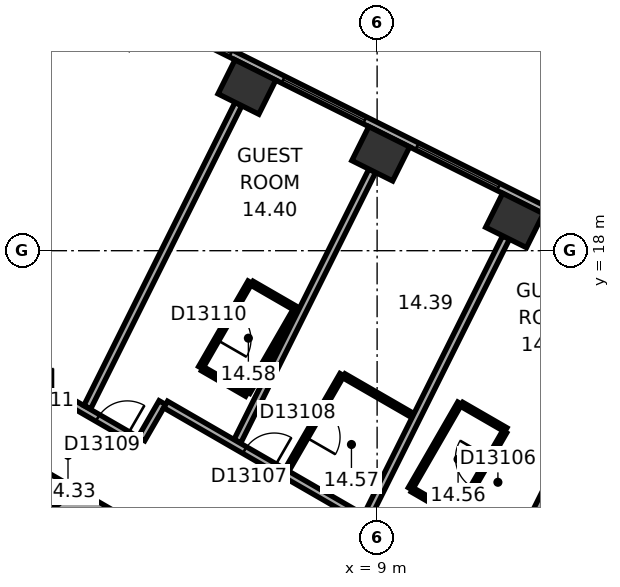
"""IFC4 building model, lengths in metres.
Left out: names, types, materials, properties, quantities, classifications, styles, units other than length and angle.
Written with IfcOpenShell. Run it as: python <this file> out.ifc"""

import sys

from ifc_helpers import new_model, si_unit, direction, frame, frame_2d, origin, origin_2d, place, context, subcontext, project, spatial, rectangle, extrude, element, fill, save


model = new_model("IFC4")
c1 = context("Model", 3, precision=1e-05, world=origin(), true_north=direction((0.0, 1.0)))
c2 = subcontext(c1, "Body", "Model", "MODEL_VIEW")
j1 = project(units=[si_unit("LENGTHUNIT", "METRE"), si_unit("PLANEANGLEUNIT", "RADIAN")], contexts=[c1])
p1 = place(None, origin())
s1 = spatial("IfcSite", under=j1, at=p1, CompositionType="ELEMENT")
p2 = place(p1, origin())
s2 = spatial("IfcBuilding", under=s1, at=p2, CompositionType="ELEMENT")
p3 = place(p2, frame((0.0, 0.0, 67.1)))
s3 = spatial("IfcBuildingStorey", under=s2, at=p3, CompositionType="ELEMENT", Elevation=67.1)
for number, where, z_axis, x_axis in (
    (1, (12.616, 18.795, 0.0), (0.0, 0.0, 1.0), (-0.895, 0.446, 0.0)),
    (2, (9.095, 20.551, 0.0), (0.0, 0.0, 1.0), (-0.895, 0.446, 0.0)),
    (3, (5.574, 22.306, 0.0), (0.0, 0.0, 1.0), (-0.895, 0.446, 0.0)),
):
    element("IfcColumn", number, at=place(p3, frame(where, z_axis=z_axis, x_axis=x_axis)), inside=s3, PredefinedType="COLUMN", context=c2, shape_type="SweptSolid", body=[
        extrude(rectangle(XDim=1.2, YDim=1.0, at=origin_2d()), origin(), (0.0, 0.0, 1.0), 3.3),
    ])
p4 = place(p3, frame((10.4, 5.658, 0.0), z_axis=(0.0, 0.0, 1.0), x_axis=(-0.866021384402, 0.500006961711, 0.0)))
e4 = element("IfcWall", 4, at=p4, inside=s3, PredefinedType="SHEAR", context=c2, shape_type="SweptSolid", body=[
    extrude(rectangle(XDim=12.355, YDim=1.2, at=frame_2d((6.178, 0.0))), origin(), (0.0, 0.0, 1.0), 3.3),
])
p5 = place(p4, frame((2.728, 0.0, 0.0)))
e5 = element("IfcOpeningElement", 5, at=p5, cuts=e4, PredefinedType="OPENING", context=c2, shape_type="SweptSolid", body=[
    extrude(rectangle(XDim=1.1, YDim=2.1, at=frame_2d((0.55, 1.05))), frame((0.0, 0.61, 0.0), z_axis=(0.0, -1.0, 0.0), x_axis=(1.0, 0.0, 0.0)), (0.0, 0.0, 1.0), 1.22),
])
p6 = place(p4, frame((5.328, 0.0, 0.0)))
e6 = element("IfcOpeningElement", 6, at=p6, cuts=e4, PredefinedType="OPENING", context=c2, shape_type="SweptSolid", body=[
    extrude(rectangle(XDim=1.1, YDim=2.1, at=frame_2d((0.55, 1.05))), frame((0.0, 0.61, 0.0), z_axis=(0.0, -1.0, 0.0), x_axis=(1.0, 0.0, 0.0)), (0.0, 0.0, 1.0), 1.22),
])
p7 = place(p4, frame((7.928, 0.0, 0.0)))
e7 = element("IfcOpeningElement", 7, at=p7, cuts=e4, PredefinedType="OPENING", context=c2, shape_type="SweptSolid", body=[
    extrude(rectangle(XDim=1.1, YDim=2.1, at=frame_2d((0.55, 1.05))), frame((0.0, 0.61, 0.0), z_axis=(0.0, -1.0, 0.0), x_axis=(1.0, 0.0, 0.0)), (0.0, 0.0, 1.0), 1.22),
])
p8 = place(p3, frame((0.3, 11.836, 0.0), z_axis=(0.0, 0.0, 1.0), x_axis=(-0.866021384402, -0.500006961711, 0.0)))
e8 = element("IfcWall", 8, at=p8, inside=s3, PredefinedType="SHEAR", context=c2, shape_type="SweptSolid", body=[
    extrude(rectangle(XDim=12.355, YDim=1.2, at=frame_2d((6.178, 0.0))), origin(), (0.0, 0.0, 1.0), 3.3),
])
p9 = place(p8, frame((6.378, 0.0, 0.0)))
e9 = element("IfcOpeningElement", 9, at=p9, cuts=e8, PredefinedType="OPENING", context=c2, shape_type="SweptSolid", body=[
    extrude(rectangle(XDim=1.5, YDim=2.1, at=frame_2d((0.75, 1.05))), frame((0.0, 0.61, 0.0), z_axis=(0.0, -1.0, 0.0), x_axis=(1.0, 0.0, 0.0)), (0.0, 0.0, 1.0), 1.22),
])
p10 = place(p8, frame((1.828, 0.0, 0.0)))
e10 = element("IfcOpeningElement", 10, at=p10, cuts=e8, PredefinedType="OPENING", context=c2, shape_type="SweptSolid", body=[
    extrude(rectangle(XDim=1.1, YDim=2.1, at=frame_2d((0.55, 1.05))), frame((0.0, 0.61, 0.0), z_axis=(0.0, -1.0, 0.0), x_axis=(1.0, 0.0, 0.0)), (0.0, 0.0, 1.0), 1.22),
])
p11 = place(p3, frame((20.63, 15.47, 0.0), z_axis=(0.0, 0.0, 1.0), x_axis=(-0.894934518609, 0.446197498203, 0.0)))
e11 = element("IfcWall", 11, at=p11, inside=s3, PredefinedType="STANDARD", context=c2, shape_type="SweptSolid", body=[
    extrude(rectangle(XDim=21.246, YDim=0.2, at=frame_2d((10.623, 0.0))), origin(), (0.0, 0.0, 1.0), 3.3),
])
p12 = place(p11, frame((1.553, 0.0, 0.8)))
e12 = element("IfcOpeningElement", 12, at=p12, cuts=e11, PredefinedType="OPENING", context=c2, shape_type="SweptSolid", body=[
    extrude(rectangle(XDim=2.4, YDim=1.7, at=frame_2d((1.2, 0.85))), frame((0.0, 0.11, 0.0), z_axis=(0.0, -1.0, 0.0), x_axis=(1.0, 0.0, 0.0)), (0.0, 0.0, 1.0), 0.22),
])
p13 = place(p11, frame((5.488, 0.0, 0.8)))
e13 = element("IfcOpeningElement", 13, at=p13, cuts=e11, PredefinedType="OPENING", context=c2, shape_type="SweptSolid", body=[
    extrude(rectangle(XDim=2.4, YDim=1.7, at=frame_2d((1.2, 0.85))), frame((0.0, 0.11, 0.0), z_axis=(0.0, -1.0, 0.0), x_axis=(1.0, 0.0, 0.0)), (0.0, 0.0, 1.0), 0.22),
])
p14 = place(p11, frame((9.422, 0.0, 0.8)))
e14 = element("IfcOpeningElement", 14, at=p14, cuts=e11, PredefinedType="OPENING", context=c2, shape_type="SweptSolid", body=[
    extrude(rectangle(XDim=2.4, YDim=1.7, at=frame_2d((1.2, 0.85))), frame((0.0, 0.11, 0.0), z_axis=(0.0, -1.0, 0.0), x_axis=(1.0, 0.0, 0.0)), (0.0, 0.0, 1.0), 0.22),
])
p15 = place(p11, frame((13.357, 0.0, 0.8)))
e15 = element("IfcOpeningElement", 15, at=p15, cuts=e11, PredefinedType="OPENING", context=c2, shape_type="SweptSolid", body=[
    extrude(rectangle(XDim=2.4, YDim=1.7, at=frame_2d((1.2, 0.85))), frame((0.0, 0.11, 0.0), z_axis=(0.0, -1.0, 0.0), x_axis=(1.0, 0.0, 0.0)), (0.0, 0.0, 1.0), 0.22),
])
p16 = place(p11, frame((17.292, 0.0, 0.8)))
e16 = element("IfcOpeningElement", 16, at=p16, cuts=e11, PredefinedType="OPENING", context=c2, shape_type="SweptSolid", body=[
    extrude(rectangle(XDim=2.4, YDim=1.7, at=frame_2d((1.2, 0.85))), frame((0.0, 0.11, 0.0), z_axis=(0.0, -1.0, 0.0), x_axis=(1.0, 0.0, 0.0)), (0.0, 0.0, 1.0), 0.22),
])
p17 = place(p3, frame((0.95, 14.001, 0.0), z_axis=(0.0, 0.0, 1.0), x_axis=(-1.0, 0.0, 0.0)))
e17 = element("IfcWall", 17, at=p17, inside=s3, PredefinedType="PARTITIONING", context=c2, shape_type="SweptSolid", body=[
    extrude(rectangle(XDim=1.86, YDim=0.2, at=frame_2d((0.93, 0.0))), origin(), (0.0, 0.0, 1.0), 3.05),
])
p18 = place(p17, frame((0.48, 0.0, 0.0)))
e18 = element("IfcOpeningElement", 18, at=p18, cuts=e17, PredefinedType="OPENING", context=c2, shape_type="SweptSolid", body=[
    extrude(rectangle(XDim=0.9, YDim=2.1, at=frame_2d((0.45, 1.05))), frame((0.0, 0.11, 0.0), z_axis=(0.0, -1.0, 0.0), x_axis=(1.0, 0.0, 0.0)), (0.0, 0.0, 1.0), 0.22),
])
p19 = place(p3, frame((2.748, 12.962, 0.0), z_axis=(0.0, 0.0, 1.0), x_axis=(-0.866013897511, 0.50001992892, 0.0)))
e19 = element("IfcWall", 19, at=p19, inside=s3, PredefinedType="PARTITIONING", context=c2, shape_type="SweptSolid", body=[
    extrude(rectangle(XDim=2.037, YDim=0.2, at=frame_2d((1.018, 0.0))), origin(), (0.0, 0.0, 1.0), 3.05),
])
p20 = place(p19, frame((0.372, 0.0, 0.0)))
e20 = element("IfcOpeningElement", 20, at=p20, cuts=e19, PredefinedType="OPENING", context=c2, shape_type="SweptSolid", body=[
    extrude(rectangle(XDim=0.9, YDim=2.1, at=frame_2d((0.45, 1.05))), frame((0.0, 0.11, 0.0), z_axis=(0.0, -1.0, 0.0), x_axis=(1.0, 0.0, 0.0)), (0.0, 0.0, 1.0), 0.22),
])
p21 = place(p3, frame((3.349, 14.002, 0.0), z_axis=(0.0, 0.0, 1.0), x_axis=(-0.500074377092, -0.865982457891, 0.0)))
e21 = element("IfcWall", 21, at=p21, inside=s3, PredefinedType="PARTITIONING", context=c2, shape_type="SweptSolid", body=[
    extrude(rectangle(XDim=1.101, YDim=0.2, at=frame_2d((0.55, 0.0))), origin(), (0.0, 0.0, 1.0), 3.05),
])
p22 = place(p3, frame((4.356, 14.922, 0.0), z_axis=(0.0, 0.0, 1.0), x_axis=(0.499936506574, 0.866062058628, 0.0)))
e22 = element("IfcWall", 22, at=p22, inside=s3, PredefinedType="PARTITIONING", context=c2, shape_type="SweptSolid", body=[
    extrude(rectangle(XDim=2.6, YDim=0.12, at=frame_2d((1.3, 0.0))), origin(), (0.0, 0.0, 1.0), 3.05),
])
p23 = place(p22, frame((0.85, 0.0, 0.0)))
e23 = element("IfcOpeningElement", 23, at=p23, cuts=e22, PredefinedType="OPENING", context=c2, shape_type="SweptSolid", body=[
    extrude(rectangle(XDim=0.9, YDim=2.1, at=frame_2d((0.45, 1.05))), frame((0.0, 0.07, 0.0), z_axis=(0.0, -1.0, 0.0), x_axis=(1.0, 0.0, 0.0)), (0.0, 0.0, 1.0), 0.14),
])
p24 = place(p3, frame((5.351, 21.859, 0.0), z_axis=(0.0, 0.0, 1.0), x_axis=(-0.446205309328, -0.894930624086, 0.0)))
e24 = element("IfcWall", 24, at=p24, inside=s3, PredefinedType="PARTITIONING", context=c2, shape_type="SweptSolid", body=[
    extrude(rectangle(XDim=8.913, YDim=0.2, at=frame_2d((4.457, 0.0))), origin(), (0.0, 0.0, 1.0), 2.6),
])
p25 = place(p3, frame((5.569, 14.222, 0.0), z_axis=(0.0, 0.0, 1.0), x_axis=(-0.866036909293, 0.499980071345, 0.0)))
e25 = element("IfcWall", 25, at=p25, inside=s3, PredefinedType="PARTITIONING", context=c2, shape_type="SweptSolid", body=[
    extrude(rectangle(XDim=1.34, YDim=0.12, at=frame_2d((0.67, 0.0))), origin(), (0.0, 0.0, 1.0), 3.05),
])
p26 = place(p3, frame((5.708, 17.144, 0.0), z_axis=(0.0, 0.0, 1.0), x_axis=(0.866082447003, -0.499901185229, 0.0)))
e26 = element("IfcWall", 26, at=p26, inside=s3, PredefinedType="PARTITIONING", context=c2, shape_type="SweptSolid", body=[
    extrude(rectangle(XDim=1.34, YDim=0.12, at=frame_2d((0.67, 0.0))), origin(), (0.0, 0.0, 1.0), 3.05),
])
p27 = place(p3, frame((6.625, 12.227, 0.0), z_axis=(0.0, 0.0, 1.0), x_axis=(0.500023687443, 0.866011727401, 0.0)))
e27 = element("IfcWall", 27, at=p27, inside=s3, PredefinedType="PARTITIONING", context=c2, shape_type="SweptSolid", body=[
    extrude(rectangle(XDim=2.9, YDim=0.12, at=frame_2d((1.45, 0.0))), origin(), (0.0, 0.0, 1.0), 3.05),
])
p28 = place(p27, frame((1.0, 0.0, 0.0)))
e28 = element("IfcOpeningElement", 28, at=p28, cuts=e27, PredefinedType="OPENING", context=c2, shape_type="SweptSolid", body=[
    extrude(rectangle(XDim=0.9, YDim=2.1, at=frame_2d((0.45, 1.05))), frame((0.0, 0.07, 0.0), z_axis=(0.0, -1.0, 0.0), x_axis=(1.0, 0.0, 0.0)), (0.0, 0.0, 1.0), 0.14),
])
p29 = place(p3, frame((6.839, 16.422, 0.0), z_axis=(0.0, 0.0, 1.0), x_axis=(-0.50000366821, -0.866023285932, 0.0)))
e29 = element("IfcWall", 29, at=p29, inside=s3, PredefinedType="PARTITIONING", context=c2, shape_type="SweptSolid", body=[
    extrude(rectangle(XDim=2.48, YDim=0.12, at=frame_2d((1.24, 0.0))), origin(), (0.0, 0.0, 1.0), 3.05),
])
p30 = place(p3, frame((8.127, 14.708, 0.0), z_axis=(0.0, 0.0, 1.0), x_axis=(0.866065472234, -0.499930592986, 0.0)))
e30 = element("IfcWall", 30, at=p30, inside=s3, PredefinedType="PARTITIONING", context=c2, shape_type="SweptSolid", body=[
    extrude(rectangle(XDim=2.098, YDim=0.12, at=frame_2d((1.049, 0.0))), origin(), (0.0, 0.0, 1.0), 3.05),
])
p31 = place(p3, frame((8.872, 20.104, 0.0), z_axis=(0.0, 0.0, 1.0), x_axis=(-0.446218378653, -0.894924107706, 0.0)))
e31 = element("IfcWall", 31, at=p31, inside=s3, PredefinedType="PARTITIONING", context=c2, shape_type="SweptSolid", body=[
    extrude(rectangle(XDim=7.95, YDim=0.2, at=frame_2d((3.975, 0.0))), origin(), (0.0, 0.0, 1.0), 3.05),
])
p32 = place(p3, frame((9.875, 11.736, 0.0), z_axis=(0.0, 0.0, 1.0), x_axis=(0.499936506574, 0.866062058628, 0.0)))
e32 = element("IfcWall", 32, at=p32, inside=s3, PredefinedType="PARTITIONING", context=c2, shape_type="SweptSolid", body=[
    extrude(rectangle(XDim=2.6, YDim=0.12, at=frame_2d((1.3, 0.0))), origin(), (0.0, 0.0, 1.0), 3.05),
])
p33 = place(p3, frame((10.885, 9.652, 0.0), z_axis=(0.0, 0.0, 1.0), x_axis=(-0.866033868542, 0.499985338323, 0.0)))
e33 = element("IfcWall", 33, at=p33, inside=s3, PredefinedType="PARTITIONING", context=c2, shape_type="SweptSolid", body=[
    extrude(rectangle(XDim=8.602, YDim=0.2, at=frame_2d((4.301, 0.0))), origin(), (0.0, 0.0, 1.0), 3.05),
])
p34 = place(p33, frame((5.302, 0.0, 0.0)))
e34 = element("IfcOpeningElement", 34, at=p34, cuts=e33, PredefinedType="OPENING", context=c2, shape_type="SweptSolid", body=[
    extrude(rectangle(XDim=0.9, YDim=2.1, at=frame_2d((0.45, 1.05))), frame((0.0, 0.11, 0.0), z_axis=(0.0, -1.0, 0.0), x_axis=(1.0, 0.0, 0.0)), (0.0, 0.0, 1.0), 0.22),
])
for number, where, z_axis, x_axis in (
    (35, (11.087, 11.036, 0.0), (0.0, 0.0, 1.0), (-0.866, 0.5, 0.0)),
    (36, (11.226, 13.958, 0.0), (0.0, 0.0, 1.0), (0.866, -0.5, 0.0)),
):
    element("IfcWall", number, at=place(p3, frame(where, z_axis=z_axis, x_axis=x_axis)), inside=s3, PredefinedType="PARTITIONING", context=c2, shape_type="SweptSolid", body=[
        extrude(rectangle(XDim=1.34, YDim=0.12, at=frame_2d((0.67, 0.0))), origin(), (0.0, 0.0, 1.0), 3.05),
    ])
p35 = place(p3, frame((12.357, 13.236, 0.0), z_axis=(0.0, 0.0, 1.0), x_axis=(-0.50000366821, -0.866023285932, 0.0)))
e37 = element("IfcWall", 37, at=p35, inside=s3, PredefinedType="PARTITIONING", context=c2, shape_type="SweptSolid", body=[
    extrude(rectangle(XDim=2.48, YDim=0.12, at=frame_2d((1.24, 0.0))), origin(), (0.0, 0.0, 1.0), 3.05),
])
p36 = place(p35, frame((0.79, 0.0, 0.0)))
e38 = element("IfcOpeningElement", 38, at=p36, cuts=e37, PredefinedType="OPENING", context=c2, shape_type="SweptSolid", body=[
    extrude(rectangle(XDim=0.9, YDim=2.1, at=frame_2d((0.45, 1.05))), frame((0.0, 0.07, 0.0), z_axis=(0.0, -1.0, 0.0), x_axis=(1.0, 0.0, 0.0)), (0.0, 0.0, 1.0), 0.14),
])
p37 = place(p3, frame((12.393, 18.348, 0.0), z_axis=(0.0, 0.0, 1.0), x_axis=(-0.446176022699, -0.894945225569, 0.0)))
e39 = element("IfcWall", 39, at=p37, inside=s3, PredefinedType="PARTITIONING", context=c2, shape_type="SweptSolid", body=[
    extrude(rectangle(XDim=8.191, YDim=0.2, at=frame_2d((4.095, 0.0))), origin(), (0.0, 0.0, 1.0), 2.6),
])
p38 = place(p3, frame((15.915, 16.592, 0.0), z_axis=(0.0, 0.0, 1.0), x_axis=(-0.446199736347, -0.894933402709, 0.0)))
e40 = element("IfcWall", 40, at=p38, inside=s3, PredefinedType="PARTITIONING", context=c2, shape_type="SweptSolid", body=[
    extrude(rectangle(XDim=9.635, YDim=0.2, at=frame_2d((4.817, 0.0))), origin(), (0.0, 0.0, 1.0), 3.05),
])
p39 = place(p14, origin())
e41 = element("IfcWindow", 41, at=p39, inside=s3, PartitioningType="SINGLE_PANEL", PredefinedType="WINDOW", context=c2, shape_type="SweptSolid", body=[
    extrude(rectangle(XDim=2.4, YDim=1.7, at=frame_2d((1.2, 0.85))), frame((0.0, 0.03, 0.0), z_axis=(0.0, -1.0, 0.0), x_axis=(1.0, 0.0, 0.0)), (0.0, 0.0, 1.0), 0.06),
])
fill(e14, e41)
p40 = place(p15, origin())
e42 = element("IfcWindow", 42, at=p40, inside=s3, PartitioningType="SINGLE_PANEL", PredefinedType="WINDOW", context=c2, shape_type="SweptSolid", body=[
    extrude(rectangle(XDim=2.4, YDim=1.7, at=frame_2d((1.2, 0.85))), frame((0.0, 0.03, 0.0), z_axis=(0.0, -1.0, 0.0), x_axis=(1.0, 0.0, 0.0)), (0.0, 0.0, 1.0), 0.06),
])
fill(e15, e42)
p41 = place(p16, origin())
e43 = element("IfcWindow", 43, at=p41, inside=s3, PartitioningType="SINGLE_PANEL", PredefinedType="WINDOW", context=c2, shape_type="SweptSolid", body=[
    extrude(rectangle(XDim=2.4, YDim=1.7, at=frame_2d((1.2, 0.85))), frame((0.0, 0.03, 0.0), z_axis=(0.0, -1.0, 0.0), x_axis=(1.0, 0.0, 0.0)), (0.0, 0.0, 1.0), 0.06),
])
fill(e16, e43)
p42 = place(p36, origin())
e44 = element("IfcDoor", 44, at=p42, inside=s3, OperationType="SINGLE_SWING_LEFT", PredefinedType="DOOR", context=c2, shape_type="SweptSolid", body=[
    extrude(rectangle(XDim=0.9, YDim=2.1, at=frame_2d((0.45, 1.05))), frame((0.0, 0.025, 0.0), z_axis=(0.0, -1.0, 0.0), x_axis=(1.0, 0.0, 0.0)), (0.0, 0.0, 1.0), 0.05),
])
fill(e38, e44)
p43 = place(p34, origin())
e45 = element("IfcDoor", 45, at=p43, inside=s3, OperationType="SINGLE_SWING_LEFT", PredefinedType="DOOR", context=c2, shape_type="SweptSolid", body=[
    extrude(rectangle(XDim=0.9, YDim=2.1, at=frame_2d((0.45, 1.05))), frame((0.0, 0.025, 0.0), z_axis=(0.0, -1.0, 0.0), x_axis=(1.0, 0.0, 0.0)), (0.0, 0.0, 1.0), 0.05),
])
fill(e34, e45)
p44 = place(p28, origin())
e46 = element("IfcDoor", 46, at=p44, inside=s3, OperationType="SINGLE_SWING_LEFT", PredefinedType="DOOR", context=c2, shape_type="SweptSolid", body=[
    extrude(rectangle(XDim=0.9, YDim=2.1, at=frame_2d((0.45, 1.05))), frame((0.0, 0.025, 0.0), z_axis=(0.0, -1.0, 0.0), x_axis=(1.0, 0.0, 0.0)), (0.0, 0.0, 1.0), 0.05),
])
fill(e28, e46)
p45 = place(p20, origin())
e47 = element("IfcDoor", 47, at=p45, inside=s3, OperationType="SINGLE_SWING_LEFT", PredefinedType="DOOR", context=c2, shape_type="SweptSolid", body=[
    extrude(rectangle(XDim=0.9, YDim=2.1, at=frame_2d((0.45, 1.05))), frame((0.0, 0.025, 0.0), z_axis=(0.0, -1.0, 0.0), x_axis=(1.0, 0.0, 0.0)), (0.0, 0.0, 1.0), 0.05),
])
fill(e20, e47)
p46 = place(p23, origin())
e48 = element("IfcDoor", 48, at=p46, inside=s3, OperationType="SINGLE_SWING_LEFT", PredefinedType="DOOR", context=c2, shape_type="SweptSolid", body=[
    extrude(rectangle(XDim=0.9, YDim=2.1, at=frame_2d((0.45, 1.05))), frame((0.0, 0.025, 0.0), z_axis=(0.0, -1.0, 0.0), x_axis=(1.0, 0.0, 0.0)), (0.0, 0.0, 1.0), 0.05),
])
fill(e23, e48)
p47 = place(p18, origin())
e49 = element("IfcDoor", 49, at=p47, inside=s3, OperationType="SINGLE_SWING_LEFT", PredefinedType="DOOR", context=c2, shape_type="SweptSolid", body=[
    extrude(rectangle(XDim=0.9, YDim=2.1, at=frame_2d((0.45, 1.05))), frame((0.0, 0.025, 0.0), z_axis=(0.0, -1.0, 0.0), x_axis=(1.0, 0.0, 0.0)), (0.0, 0.0, 1.0), 0.05),
])
fill(e18, e49)
save(model, sys.argv[1])
